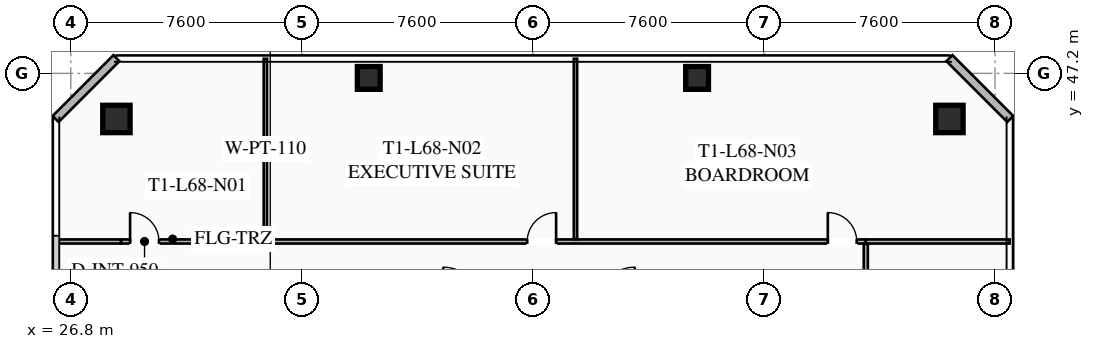
"""IFC4 building model, lengths in metres.
Left out: names, types, materials, properties, quantities, classifications, styles, units other than length and angle.
Written with IfcOpenShell. Run it as: python <this file> out.ifc"""

import sys

from ifc_helpers import new_model, si_unit, direction, frame, frame_2d, origin, origin_2d, place, context, subcontext, project, spatial, rectangle, hollow_rectangle, extrude, element, fill, save


model = new_model("IFC4")
c1 = context("Model", 3, precision=1e-05, world=origin(), true_north=direction((0.0, 1.0)))
c2 = subcontext(c1, "Body", "Model", "MODEL_VIEW")
j1 = project(units=[si_unit("LENGTHUNIT", "METRE"), si_unit("PLANEANGLEUNIT", "RADIAN")], contexts=[c1])
p1 = place(None, origin())
s1 = spatial("IfcSite", under=j1, at=p1, CompositionType="ELEMENT")
p2 = place(p1, origin())
s2 = spatial("IfcBuilding", under=s1, at=p2, CompositionType="ELEMENT")
p3 = place(p2, frame((0.0, 0.0, 251.4)))
s3 = spatial("IfcBuildingStorey", under=s2, at=p3, CompositionType="ELEMENT", Elevation=251.4)
for number, where, z_axis, x_axis in (
    (1, (55.7, 45.7, 0.0), (0.0, 0.0, 1.0), (1.0, 0.0, 0.0)),
    (2, (28.3, 45.7, 0.0), (0.0, 0.0, 1.0), (1.0, 0.0, 0.0)),
):
    element("IfcColumn", number, at=place(p3, frame(where, z_axis=z_axis, x_axis=x_axis)), inside=s3, PredefinedType="COLUMN", context=c2, shape_type="SweptSolid", body=[
        extrude(hollow_rectangle(XDim=0.9, YDim=0.9, WallThickness=0.04, at=origin_2d()), origin(), (0.0, 0.0, 1.0), 3.78),
    ])
for number, where, z_axis, x_axis in (
    (3, (47.4, 47.05, 0.0), (0.0, 0.0, 1.0), (1.0, 0.0, 0.0)),
    (4, (36.6, 47.05, 0.0), (0.0, 0.0, 1.0), (1.0, 0.0, 0.0)),
):
    element("IfcColumn", number, at=place(p3, frame(where, z_axis=z_axis, x_axis=x_axis)), inside=s3, PredefinedType="COLUMN", context=c2, shape_type="SweptSolid", body=[
        extrude(hollow_rectangle(XDim=0.75, YDim=0.75, WallThickness=0.032, at=origin_2d()), origin(), (0.0, 0.0, 1.0), 3.78),
    ])
for number, where, z_axis, x_axis in (
    (5, (26.3, 45.7, 0.0), (0.0, 0.0, 1.0), (0.707, 0.707, 0.0)),
    (6, (55.7, 47.7, 0.0), (0.0, 0.0, 1.0), (0.707, -0.707, 0.0)),
):
    element("IfcWall", number, at=place(p3, frame(where, z_axis=z_axis, x_axis=x_axis)), inside=s3, PredefinedType="SOLIDWALL", context=c2, shape_type="SweptSolid", body=[
        extrude(rectangle(XDim=2.828, YDim=0.28, at=frame_2d((1.414, 0.0))), origin(), (0.0, 0.0, 1.0), 3.78),
    ])
p4 = place(p3, frame((28.45, 41.67, 0.0), z_axis=(0.0, 0.0, 1.0), x_axis=(1.0, 0.0, 0.0)))
e7 = element("IfcWall", 7, at=p4, inside=s3, PredefinedType="PARTITIONING", context=c2, shape_type="SweptSolid", body=[
    extrude(rectangle(XDim=24.5, YDim=0.135, at=frame_2d((12.25, 0.0))), origin(), (0.0, 0.0, 1.0), 2.971),
])
p5 = place(p4, frame((0.3, 0.0, 0.0)))
e8 = element("IfcOpeningElement", 8, at=p5, cuts=e7, PredefinedType="OPENING", context=c2, shape_type="SweptSolid", body=[
    extrude(rectangle(XDim=0.95, YDim=2.05, at=frame_2d((0.475, 1.025))), frame((0.0, 0.077, 0.0), z_axis=(0.0, -1.0, 0.0), x_axis=(1.0, 0.0, 0.0)), (0.0, 0.0, 1.0), 0.155),
])
p6 = place(p4, frame((13.363, 0.0, 0.0)))
e9 = element("IfcOpeningElement", 9, at=p6, cuts=e7, PredefinedType="OPENING", context=c2, shape_type="SweptSolid", body=[
    extrude(rectangle(XDim=0.95, YDim=2.05, at=frame_2d((0.475, 1.025))), frame((0.0, 0.077, 0.0), z_axis=(0.0, -1.0, 0.0), x_axis=(1.0, 0.0, 0.0)), (0.0, 0.0, 1.0), 0.155),
])
p7 = place(p4, frame((23.25, 0.0, 0.0)))
e10 = element("IfcOpeningElement", 10, at=p7, cuts=e7, PredefinedType="OPENING", context=c2, shape_type="SweptSolid", body=[
    extrude(rectangle(XDim=0.95, YDim=2.05, at=frame_2d((0.475, 1.025))), frame((0.0, 0.077, 0.0), z_axis=(0.0, -1.0, 0.0), x_axis=(1.0, 0.0, 0.0)), (0.0, 0.0, 1.0), 0.155),
])
p8 = place(p3, frame((26.32, 41.67, 0.0), z_axis=(0.0, 0.0, 1.0), x_axis=(1.0, 0.0, 0.0)))
e11 = element("IfcWall", 11, at=p8, inside=s3, PredefinedType="PARTITIONING", context=c2, shape_type="SweptSolid", body=[
    extrude(rectangle(XDim=2.13, YDim=0.135, at=frame_2d((1.065, 0.0))), origin(), (0.0, 0.0, 1.0), 2.971),
])
p9 = place(p3, frame((52.95, 41.67, 0.0), z_axis=(0.0, 0.0, 1.0), x_axis=(1.0, 0.0, 0.0)))
e12 = element("IfcWall", 12, at=p9, inside=s3, PredefinedType="PARTITIONING", context=c2, shape_type="SweptSolid", body=[
    extrude(rectangle(XDim=4.73, YDim=0.135, at=frame_2d((2.365, 0.0))), origin(), (0.0, 0.0, 1.0), 2.971),
])
for number, where, z_axis, x_axis in (
    (13, (33.2, 41.75, 0.0), (0.0, 0.0, 1.0), (0.0, 1.0, 0.0)),
    (14, (43.4, 41.75, 0.0), (0.0, 0.0, 1.0), (0.0, 1.0, 0.0)),
):
    element("IfcWall", number, at=place(p3, frame(where, z_axis=z_axis, x_axis=x_axis)), inside=s3, PredefinedType="PARTITIONING", context=c2, shape_type="SweptSolid", body=[
        extrude(rectangle(XDim=5.93, YDim=0.11, at=frame_2d((2.965, 0.0))), origin(), (0.0, 0.0, 1.0), 2.971),
    ])
p10 = place(p3, frame((52.95, 41.59, 0.0), z_axis=(0.0, 0.0, 1.0), x_axis=(0.0, -1.0, 0.0)))
e15 = element("IfcWall", 15, at=p10, inside=s3, PredefinedType="PARTITIONING", context=c2, shape_type="SweptSolid", body=[
    extrude(rectangle(XDim=9.11, YDim=0.135, at=frame_2d((4.555, 0.0))), origin(), (0.0, 0.0, 1.0), 2.971),
])
p11 = place(p10, frame((2.1, 0.0, 0.0)))
e16 = element("IfcOpeningElement", 16, at=p11, cuts=e15, PredefinedType="OPENING", context=c2, shape_type="SweptSolid", body=[
    extrude(rectangle(XDim=0.95, YDim=2.05, at=frame_2d((0.475, 1.025))), frame((0.0, 0.077, 0.0), z_axis=(0.0, -1.0, 0.0), x_axis=(1.0, 0.0, 0.0)), (0.0, 0.0, 1.0), 0.155),
])
p12 = place(p5, origin())
e17 = element("IfcDoor", 17, at=p12, inside=s3, OperationType="SINGLE_SWING_LEFT", PredefinedType="DOOR", context=c2, shape_type="SweptSolid", body=[
    extrude(rectangle(XDim=0.95, YDim=2.05, at=frame_2d((0.475, 1.025))), frame((0.0, 0.025, 0.0), z_axis=(0.0, -1.0, 0.0), x_axis=(1.0, 0.0, 0.0)), (0.0, 0.0, 1.0), 0.05),
])
fill(e8, e17)
p13 = place(p6, origin())
e18 = element("IfcDoor", 18, at=p13, inside=s3, OperationType="SINGLE_SWING_RIGHT", PredefinedType="DOOR", context=c2, shape_type="SweptSolid", body=[
    extrude(rectangle(XDim=0.95, YDim=2.05, at=frame_2d((0.475, 1.025))), frame((0.0, 0.025, 0.0), z_axis=(0.0, -1.0, 0.0), x_axis=(1.0, 0.0, 0.0)), (0.0, 0.0, 1.0), 0.05),
])
fill(e9, e18)
p14 = place(p7, origin())
e19 = element("IfcDoor", 19, at=p14, inside=s3, OperationType="SINGLE_SWING_LEFT", PredefinedType="DOOR", context=c2, shape_type="SweptSolid", body=[
    extrude(rectangle(XDim=0.95, YDim=2.05, at=frame_2d((0.475, 1.025))), frame((0.0, 0.025, 0.0), z_axis=(0.0, -1.0, 0.0), x_axis=(1.0, 0.0, 0.0)), (0.0, 0.0, 1.0), 0.05),
])
fill(e10, e19)
save(model, sys.argv[1])
